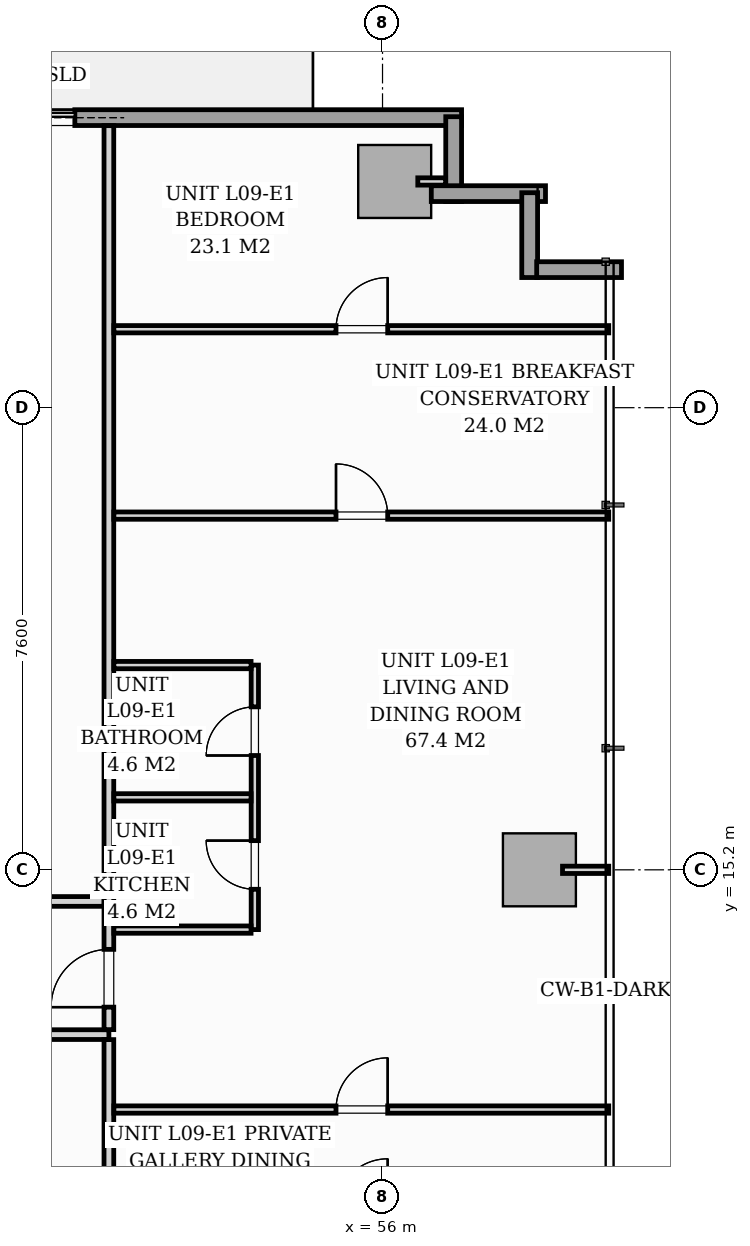
"""IFC4 building model, lengths in metres.
Left out: names, types, materials, properties, quantities, classifications, styles, units other than length and angle.
Written with IfcOpenShell. Run it as: python <this file> out.ifc"""

import sys

from ifc_helpers import new_model, si_unit, direction, frame, frame_2d, origin, origin_2d, place, context, subcontext, project, spatial, rectangle, extrude, source, transform, mapped, element, fill, save


model = new_model("IFC4")
c1 = context("Model", 3, precision=1e-05, world=origin(), true_north=direction((0.0, 1.0)))
c2 = subcontext(c1, "Body", "Model", "MODEL_VIEW")
j1 = project(units=[si_unit("LENGTHUNIT", "METRE"), si_unit("PLANEANGLEUNIT", "RADIAN")], contexts=[c1])
p1 = place(None, origin())
s1 = spatial("IfcSite", under=j1, at=p1, CompositionType="ELEMENT")
p2 = place(p1, origin())
s2 = spatial("IfcBuilding", under=s1, at=p2, CompositionType="ELEMENT")
p3 = place(p2, frame((0.0, 0.0, 35.8)))
s3 = spatial("IfcBuildingStorey", under=s2, at=p3, CompositionType="ELEMENT", Elevation=35.8)
m1 = source(origin(), c2, "Body", "SweptSolid", [
    extrude(rectangle(XDim=1.2, YDim=1.2, at=origin_2d()), origin(), (0.0, 0.0, 1.0), 3.196),
])
for number, where, z_axis, x_axis in (
    (1, (56.2, 26.52, 0.002), (0.0, 0.0, 1.0), (1.0, 0.0, 0.0)),
    (2, (58.58, 15.2, 0.002), (0.0, 0.0, 1.0), (1.0, 0.0, 0.0)),
):
    element("IfcColumn", number, at=place(p3, frame(where, z_axis=z_axis, x_axis=x_axis)), inside=s3, PredefinedType="COLUMN", context=c2, shape_type="MappedRepresentation", body=[
        mapped(m1, transform((0.0, 0.0, 0.0), scale=1.0)),
    ])
p4 = place(p3, frame((40.15, 27.57, 0.0), z_axis=(0.0, 0.0, 1.0), x_axis=(1.0, 0.0, 0.0)))
e3 = element("IfcWall", 3, at=p4, inside=s3, PredefinedType="STANDARD", context=c2, shape_type="SweptSolid", body=[
    extrude(rectangle(XDim=17.15, YDim=0.26, at=frame_2d((8.575, 0.0))), origin(), (0.0, 0.0, 1.0), 2.94),
])
p5 = place(p4, frame((8.99, 0.0, 0.0)))
e4 = element("IfcOpeningElement", 4, at=p5, cuts=e3, PredefinedType="OPENING", context=c2, shape_type="SweptSolid", body=[
    extrude(rectangle(XDim=1.8, YDim=2.06, at=frame_2d((0.9, 1.03))), frame((0.0, 0.14, 0.0), z_axis=(0.0, -1.0, 0.0), x_axis=(1.0, 0.0, 0.0)), (0.0, 0.0, 1.0), 0.28),
])
p6 = place(p4, frame((0.7, 0.0, 0.65)))
e5 = element("IfcOpeningElement", 5, at=p6, cuts=e3, PredefinedType="OPENING", context=c2, shape_type="SweptSolid", body=[
    extrude(rectangle(XDim=1.6, YDim=1.5, at=frame_2d((0.8, 0.75))), frame((0.0, 0.14, 0.0), z_axis=(0.0, -1.0, 0.0), x_axis=(1.0, 0.0, 0.0)), (0.0, 0.0, 1.0), 0.28),
])
p7 = place(p3, frame((57.17, 27.585, 0.0), z_axis=(0.0, 0.0, 1.0), x_axis=(0.0, -1.0, 0.0)))
e6 = element("IfcWall", 6, at=p7, inside=s3, PredefinedType="STANDARD", context=c2, shape_type="SweptSolid", body=[
    extrude(rectangle(XDim=1.395, YDim=0.26, at=frame_2d((0.698, 0.0))), origin(), (0.0, 0.0, 1.0), 2.94),
])
p8 = place(p3, frame((56.802, 26.32, 0.0), z_axis=(0.0, 0.0, 1.0), x_axis=(1.0, 0.0, 0.0)))
e7 = element("IfcWall", 7, at=p8, inside=s3, PredefinedType="STANDARD", context=c2, shape_type="SweptSolid", body=[
    extrude(rectangle(XDim=1.878, YDim=0.26, at=frame_2d((0.939, 0.0))), origin(), (0.0, 0.0, 1.0), 2.94),
])
for number, where, z_axis, x_axis in (
    (8, (58.42, 26.335, 0.0), (0.0, 0.0, 1.0), (0.0, -1.0, 0.0)),
    (9, (58.535, 25.07, 0.0), (0.0, 0.0, 1.0), (1.0, 0.0, 0.0)),
):
    element("IfcWall", number, at=place(p3, frame(where, z_axis=z_axis, x_axis=x_axis)), inside=s3, PredefinedType="STANDARD", context=c2, shape_type="SweptSolid", body=[
        extrude(rectangle(XDim=1.395, YDim=0.26, at=frame_2d((0.698, 0.0))), origin(), (0.0, 0.0, 1.0), 2.94),
    ])
p9 = place(p3, frame((16.3, 12.49, 0.0), z_axis=(0.0, 0.0, 1.0), x_axis=(1.0, 0.0, 0.0)))
e10 = element("IfcWall", 10, at=p9, inside=s3, PredefinedType="PARTITIONING", context=c2, shape_type="SweptSolid", body=[
    extrude(rectangle(XDim=35.2, YDim=0.16, at=frame_2d((17.6, 0.0))), origin(), (0.0, 0.0, 1.0), 2.94),
])
p10 = place(p9, frame((11.072, 0.0, 0.0)))
e11 = element("IfcOpeningElement", 11, at=p10, cuts=e10, PredefinedType="OPENING", context=c2, shape_type="SweptSolid", body=[
    extrude(rectangle(XDim=0.95, YDim=2.06, at=frame_2d((0.475, 1.03))), frame((0.0, 0.09, 0.0), z_axis=(0.0, -1.0, 0.0), x_axis=(1.0, 0.0, 0.0)), (0.0, 0.0, 1.0), 0.18),
])
p11 = place(p9, frame((24.032, 0.0, 0.0)))
e12 = element("IfcOpeningElement", 12, at=p11, cuts=e10, PredefinedType="OPENING", context=c2, shape_type="SweptSolid", body=[
    extrude(rectangle(XDim=0.95, YDim=2.06, at=frame_2d((0.475, 1.03))), frame((0.0, 0.09, 0.0), z_axis=(0.0, -1.0, 0.0), x_axis=(1.0, 0.0, 0.0)), (0.0, 0.0, 1.0), 0.18),
])
p12 = place(p3, frame((51.5, 2.962, 0.0), z_axis=(0.0, 0.0, 1.0), x_axis=(0.0, 1.0, 0.0)))
e13 = element("IfcWall", 13, at=p12, inside=s3, PredefinedType="PARTITIONING", context=c2, shape_type="SweptSolid", body=[
    extrude(rectangle(XDim=9.446, YDim=0.16, at=frame_2d((4.723, 0.0))), origin(), (0.0, 0.0, 1.0), 2.94),
])
p13 = place(p3, frame((51.5, 12.572, 0.0), z_axis=(0.0, 0.0, 1.0), x_axis=(0.0, 1.0, 0.0)))
e14 = element("IfcWall", 14, at=p13, inside=s3, PredefinedType="PARTITIONING", context=c2, shape_type="SweptSolid", body=[
    extrude(rectangle(XDim=14.866, YDim=0.16, at=frame_2d((7.433, 0.0))), origin(), (0.0, 0.0, 1.0), 2.94),
])
p14 = place(p13, frame((0.37, 0.0, 0.0)))
e15 = element("IfcOpeningElement", 15, at=p14, cuts=e14, PredefinedType="OPENING", context=c2, shape_type="SweptSolid", body=[
    extrude(rectangle(XDim=0.95, YDim=2.06, at=frame_2d((0.475, 1.03))), frame((0.0, 0.09, 0.0), z_axis=(0.0, -1.0, 0.0), x_axis=(1.0, 0.0, 0.0)), (0.0, 0.0, 1.0), 0.18),
])
p15 = place(p3, frame((53.9, 14.217, 0.0), z_axis=(0.0, 0.0, 1.0), x_axis=(0.0, 1.0, 0.0)))
e16 = element("IfcWall", 16, at=p15, inside=s3, PredefinedType="PARTITIONING", context=c2, shape_type="SweptSolid", body=[
    extrude(rectangle(XDim=4.35, YDim=0.12, at=frame_2d((2.175, 0.0))), origin(), (0.0, 0.0, 1.0), 2.94),
])
p16 = place(p15, frame((0.663, 0.0, 0.0)))
e17 = element("IfcOpeningElement", 17, at=p16, cuts=e16, PredefinedType="OPENING", context=c2, shape_type="SweptSolid", body=[
    extrude(rectangle(XDim=0.8, YDim=2.0, at=frame_2d((0.4, 1.0))), frame((0.0, 0.07, 0.0), z_axis=(0.0, -1.0, 0.0), x_axis=(1.0, 0.0, 0.0)), (0.0, 0.0, 1.0), 0.14),
])
p17 = place(p15, frame((2.863, 0.0, 0.0)))
e18 = element("IfcOpeningElement", 18, at=p17, cuts=e16, PredefinedType="OPENING", context=c2, shape_type="SweptSolid", body=[
    extrude(rectangle(XDim=0.8, YDim=2.02, at=frame_2d((0.4, 1.01))), frame((0.0, 0.07, 0.0), z_axis=(0.0, -1.0, 0.0), x_axis=(1.0, 0.0, 0.0)), (0.0, 0.0, 1.0), 0.14),
])
p18 = place(p3, frame((51.582, 16.392, 0.0), z_axis=(0.0, 0.0, 1.0), x_axis=(1.0, 0.0, 0.0)))
e19 = element("IfcWall", 19, at=p18, inside=s3, PredefinedType="PARTITIONING", context=c2, shape_type="SweptSolid", body=[
    extrude(rectangle(XDim=2.256, YDim=0.12, at=frame_2d((1.128, 0.0))), origin(), (0.0, 0.0, 1.0), 2.045),
])
for number, where, z_axis, x_axis in (
    (20, (51.582, 14.217, 0.0), (0.0, 0.0, 1.0), (1.0, 0.0, 0.0)),
    (21, (51.582, 18.567, 0.0), (0.0, 0.0, 1.0), (1.0, 0.0, 0.0)),
):
    element("IfcWall", number, at=place(p3, frame(where, z_axis=z_axis, x_axis=x_axis)), inside=s3, PredefinedType="PARTITIONING", context=c2, shape_type="SweptSolid", body=[
        extrude(rectangle(XDim=2.256, YDim=0.12, at=frame_2d((1.128, 0.0))), origin(), (0.0, 0.0, 1.0), 2.94),
    ])
p19 = place(p3, frame((51.582, 24.09, 0.0), z_axis=(0.0, 0.0, 1.0), x_axis=(1.0, 0.0, 0.0)))
e22 = element("IfcWall", 22, at=p19, inside=s3, PredefinedType="PARTITIONING", context=c2, shape_type="SweptSolid", body=[
    extrude(rectangle(XDim=8.138, YDim=0.12, at=frame_2d((4.069, 0.0))), origin(), (0.0, 0.0, 1.0), 2.94),
])
p20 = place(p19, frame((3.653, 0.0, 0.0)))
e23 = element("IfcOpeningElement", 23, at=p20, cuts=e22, PredefinedType="OPENING", context=c2, shape_type="SweptSolid", body=[
    extrude(rectangle(XDim=0.85, YDim=2.05, at=frame_2d((0.425, 1.025))), frame((0.0, 0.07, 0.0), z_axis=(0.0, -1.0, 0.0), x_axis=(1.0, 0.0, 0.0)), (0.0, 0.0, 1.0), 0.14),
])
p21 = place(p3, frame((51.582, 21.025, 0.0), z_axis=(0.0, 0.0, 1.0), x_axis=(1.0, 0.0, 0.0)))
e24 = element("IfcWall", 24, at=p21, inside=s3, PredefinedType="PARTITIONING", context=c2, shape_type="SweptSolid", body=[
    extrude(rectangle(XDim=8.138, YDim=0.12, at=frame_2d((4.069, 0.0))), origin(), (0.0, 0.0, 1.0), 2.94),
])
p22 = place(p21, frame((3.653, 0.0, 0.0)))
e25 = element("IfcOpeningElement", 25, at=p22, cuts=e24, PredefinedType="OPENING", context=c2, shape_type="SweptSolid", body=[
    extrude(rectangle(XDim=0.85, YDim=2.05, at=frame_2d((0.425, 1.025))), frame((0.0, 0.07, 0.0), z_axis=(0.0, -1.0, 0.0), x_axis=(1.0, 0.0, 0.0)), (0.0, 0.0, 1.0), 0.14),
])
p23 = place(p3, frame((51.582, 11.258, 0.0), z_axis=(0.0, 0.0, 1.0), x_axis=(1.0, 0.0, 0.0)))
e26 = element("IfcWall", 26, at=p23, inside=s3, PredefinedType="PARTITIONING", context=c2, shape_type="SweptSolid", body=[
    extrude(rectangle(XDim=8.138, YDim=0.12, at=frame_2d((4.069, 0.0))), origin(), (0.0, 0.0, 1.0), 2.94),
])
p24 = place(p23, frame((3.653, 0.0, 0.0)))
e27 = element("IfcOpeningElement", 27, at=p24, cuts=e26, PredefinedType="OPENING", context=c2, shape_type="SweptSolid", body=[
    extrude(rectangle(XDim=0.85, YDim=2.05, at=frame_2d((0.425, 1.025))), frame((0.0, 0.07, 0.0), z_axis=(0.0, -1.0, 0.0), x_axis=(1.0, 0.0, 0.0)), (0.0, 0.0, 1.0), 0.14),
])
p25 = place(p3, frame((45.84, 14.68, 0.0), z_axis=(0.0, 0.0, 1.0), x_axis=(1.0, 0.0, 0.0)))
e28 = element("IfcWall", 28, at=p25, inside=s3, PredefinedType="PARTITIONING", context=c2, shape_type="SweptSolid", body=[
    extrude(rectangle(XDim=5.578, YDim=0.16, at=frame_2d((2.789, 0.0))), origin(), (0.0, 0.0, 1.0), 2.94),
])
p26 = place(p25, frame((2.415, 0.0, 0.0)))
e29 = element("IfcOpeningElement", 29, at=p26, cuts=e28, PredefinedType="OPENING", context=c2, shape_type="SweptSolid", body=[
    extrude(rectangle(XDim=0.95, YDim=2.06, at=frame_2d((0.475, 1.03))), frame((0.0, 0.09, 0.0), z_axis=(0.0, -1.0, 0.0), x_axis=(1.0, 0.0, 0.0)), (0.0, 0.0, 1.0), 0.18),
])
p27 = place(p3, frame((56.58, 26.52, 0.0), z_axis=(0.0, 0.0, 1.0), x_axis=(1.0, 0.0, 0.0)))
e30 = element("IfcWall", 30, at=p27, inside=s3, PredefinedType="PARTITIONING", context=c2, shape_type="SweptSolid", body=[
    extrude(rectangle(XDim=0.458, YDim=0.12, at=frame_2d((0.229, 0.0))), origin(), (0.0, 0.0, 1.0), 2.94),
])
p28 = place(p3, frame((58.96, 15.2, 0.0), z_axis=(0.0, 0.0, 1.0), x_axis=(1.0, 0.0, 0.0)))
e31 = element("IfcWall", 31, at=p28, inside=s3, PredefinedType="PARTITIONING", context=c2, shape_type="SweptSolid", body=[
    extrude(rectangle(XDim=0.76, YDim=0.12, at=frame_2d((0.38, 0.0))), origin(), (0.0, 0.0, 1.0), 2.94),
])
m2 = source(origin(), c2, "Body", "SweptSolid", [
    extrude(rectangle(XDim=1.8, YDim=2.06, at=frame_2d((0.9, 1.03))), frame((0.0, 0.025, 0.0), z_axis=(0.0, -1.0, 0.0), x_axis=(1.0, 0.0, 0.0)), (0.0, 0.0, 1.0), 0.05),
])
p29 = place(p5, origin())
e32 = element("IfcDoor", 32, at=p29, inside=s3, OperationType="SLIDING_TO_RIGHT", PredefinedType="DOOR", context=c2, shape_type="MappedRepresentation", body=[
    mapped(m2, transform((0.0, 0.0, 0.0), scale=1.0)),
])
fill(e4, e32)
m3 = source(origin(), c2, "Body", "SweptSolid", [
    extrude(rectangle(XDim=0.95, YDim=2.06, at=frame_2d((0.475, 1.03))), frame((0.0, 0.025, 0.0), z_axis=(0.0, -1.0, 0.0), x_axis=(1.0, 0.0, 0.0)), (0.0, 0.0, 1.0), 0.05),
])
p30 = place(p14, origin())
e33 = element("IfcDoor", 33, at=p30, inside=s3, OperationType="SINGLE_SWING_LEFT", PredefinedType="DOOR", context=c2, shape_type="MappedRepresentation", body=[
    mapped(m3, transform((0.0, 0.0, 0.0), scale=1.0)),
])
fill(e15, e33)
m4 = source(origin(), c2, "Body", "SweptSolid", [
    extrude(rectangle(XDim=0.8, YDim=2.0, at=frame_2d((0.4, 1.0))), frame((0.0, 0.025, 0.0), z_axis=(0.0, -1.0, 0.0), x_axis=(1.0, 0.0, 0.0)), (0.0, 0.0, 1.0), 0.05),
])
p31 = place(p16, origin())
e34 = element("IfcDoor", 34, at=p31, inside=s3, OperationType="SINGLE_SWING_RIGHT", PredefinedType="DOOR", context=c2, shape_type="MappedRepresentation", body=[
    mapped(m4, transform((0.0, 0.0, 0.0), scale=1.0)),
])
fill(e17, e34)
m5 = source(origin(), c2, "Body", "SweptSolid", [
    extrude(rectangle(XDim=0.8, YDim=2.02, at=frame_2d((0.4, 1.01))), frame((0.0, 0.025, 0.0), z_axis=(0.0, -1.0, 0.0), x_axis=(1.0, 0.0, 0.0)), (0.0, 0.0, 1.0), 0.05),
])
p32 = place(p17, origin())
e35 = element("IfcDoor", 35, at=p32, inside=s3, OperationType="SINGLE_SWING_LEFT", PredefinedType="DOOR", context=c2, shape_type="MappedRepresentation", body=[
    mapped(m5, transform((0.0, 0.0, 0.0), scale=1.0)),
])
fill(e18, e35)
m6 = source(origin(), c2, "Body", "SweptSolid", [
    extrude(rectangle(XDim=0.85, YDim=2.05, at=frame_2d((0.425, 1.025))), frame((0.0, 0.025, 0.0), z_axis=(0.0, -1.0, 0.0), x_axis=(1.0, 0.0, 0.0)), (0.0, 0.0, 1.0), 0.05),
])
p33 = place(p20, origin())
e36 = element("IfcDoor", 36, at=p33, inside=s3, OperationType="SINGLE_SWING_RIGHT", PredefinedType="DOOR", context=c2, shape_type="MappedRepresentation", body=[
    mapped(m6, transform((0.0, 0.0, 0.0), scale=1.0)),
])
fill(e23, e36)
p34 = place(p22, origin())
e37 = element("IfcDoor", 37, at=p34, inside=s3, OperationType="SINGLE_SWING_LEFT", PredefinedType="DOOR", context=c2, shape_type="MappedRepresentation", body=[
    mapped(m6, transform((0.0, 0.0, 0.0), scale=1.0)),
])
fill(e25, e37)
p35 = place(p24, origin())
e38 = element("IfcDoor", 38, at=p35, inside=s3, OperationType="SINGLE_SWING_RIGHT", PredefinedType="DOOR", context=c2, shape_type="MappedRepresentation", body=[
    mapped(m6, transform((0.0, 0.0, 0.0), scale=1.0)),
])
fill(e27, e38)
save(model, sys.argv[1])
